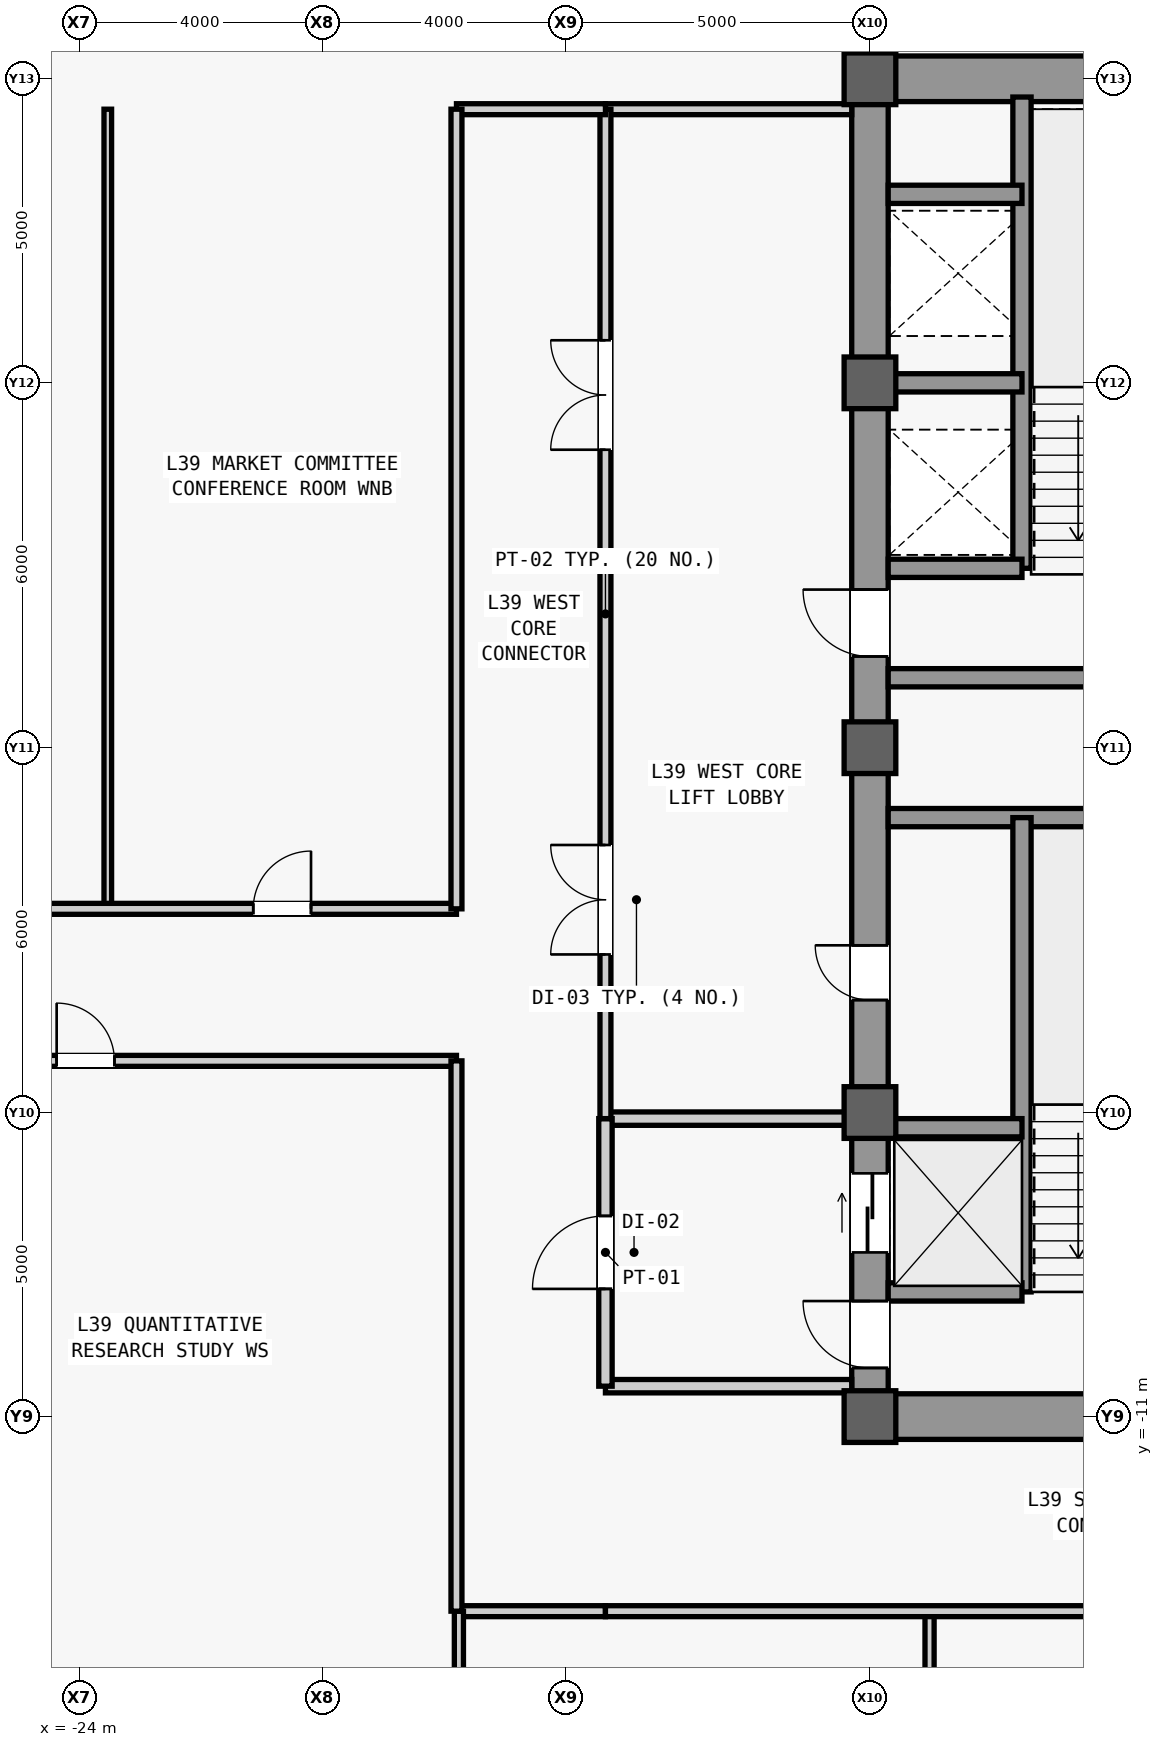
"""IFC4 building model, lengths in metres.
Left out: names, types, materials, properties, quantities, classifications, styles, units other than length and angle.
Written with IfcOpenShell. Run it as: python <this file> out.ifc"""

import sys

from ifc_helpers import new_model, si_unit, direction, frame, frame_2d, origin, origin_2d, place, context, subcontext, project, spatial, rectangle, extrude, source, transform, mapped, element, fill, save


model = new_model("IFC4")
c1 = context("Model", 3, precision=1e-05, world=origin(), true_north=direction((0.0, 1.0)))
c2 = subcontext(c1, "Body", "Model", "MODEL_VIEW")
j1 = project(units=[si_unit("LENGTHUNIT", "METRE"), si_unit("PLANEANGLEUNIT", "RADIAN")], contexts=[c1])
p1 = place(None, origin())
s1 = spatial("IfcSite", under=j1, at=p1, CompositionType="ELEMENT")
p2 = place(p1, origin())
s2 = spatial("IfcBuilding", under=s1, at=p2, CompositionType="ELEMENT")
p3 = place(p2, frame((0.0, 0.0, 171.1)))
s3 = spatial("IfcBuildingStorey", under=s2, at=p3, CompositionType="ELEMENT", Elevation=171.1)
m1 = source(origin(), c2, "Body", "SweptSolid", [
    extrude(rectangle(XDim=22.0, YDim=0.6, at=frame_2d((11.0, 0.0))), origin(), (0.0, 0.0, 1.0), 3.78),
])
p4 = place(p3, frame((-11.0, -11.0, 0.0), z_axis=(0.0, 0.0, 1.0), x_axis=(0.0, 1.0, 0.0)))
e1 = element("IfcWall", 1, at=p4, inside=s3, PredefinedType="SHEAR", context=c2, shape_type="MappedRepresentation", body=[
    mapped(m1, transform((0.0, 0.0, 0.0), scale=1.0)),
])
m2 = source(origin(), c2, "Body", "SweptSolid", [
    extrude(rectangle(XDim=1.1, YDim=2.2, at=frame_2d((0.55, 1.1))), frame((0.0, 0.31, 0.0), z_axis=(0.0, -1.0, 0.0), x_axis=(1.0, 0.0, 0.0)), (0.0, 0.0, 1.0), 0.62),
])
p5 = place(p4, frame((0.8, 0.0, 0.0)))
e2 = element("IfcOpeningElement", 2, at=p5, cuts=e1, PredefinedType="OPENING", context=c2, shape_type="MappedRepresentation", body=[
    mapped(m2, transform((0.0, 0.0, 0.0), scale=1.0)),
])
p6 = place(p4, frame((12.5, 0.0, 0.0)))
e3 = element("IfcOpeningElement", 3, at=p6, cuts=e1, PredefinedType="OPENING", context=c2, shape_type="MappedRepresentation", body=[
    mapped(m2, transform((0.0, 0.0, 0.0), scale=1.0)),
])
m3 = source(origin(), c2, "Body", "SweptSolid", [
    extrude(rectangle(XDim=0.9, YDim=2.15, at=frame_2d((0.45, 1.075))), frame((0.0, 0.31, 0.0), z_axis=(0.0, -1.0, 0.0), x_axis=(1.0, 0.0, 0.0)), (0.0, 0.0, 1.0), 0.62),
])
p7 = place(p4, frame((6.85, 0.0, 0.0)))
e4 = element("IfcOpeningElement", 4, at=p7, cuts=e1, PredefinedType="OPENING", context=c2, shape_type="MappedRepresentation", body=[
    mapped(m3, transform((0.0, 0.0, 0.0), scale=1.0)),
])
m4 = source(origin(), c2, "Body", "SweptSolid", [
    extrude(rectangle(XDim=1.3, YDim=2.3, at=frame_2d((0.65, 1.15))), frame((0.0, 0.31, 0.0), z_axis=(0.0, -1.0, 0.0), x_axis=(1.0, 0.0, 0.0)), (0.0, 0.0, 1.0), 0.62),
])
p8 = place(p4, frame((2.7, 0.0, 0.0)))
e5 = element("IfcOpeningElement", 5, at=p8, cuts=e1, PredefinedType="OPENING", context=c2, shape_type="MappedRepresentation", body=[
    mapped(m4, transform((0.0, 0.0, 0.0), scale=1.0)),
])
m5 = source(origin(), c2, "Body", "SweptSolid", [
    extrude(rectangle(XDim=5.85, YDim=0.75, at=frame_2d((2.925, 0.0))), origin(), (0.0, 0.0, 1.0), 3.78),
])
for number, where, z_axis, x_axis in (
    (6, (-10.7, -11.0, 0.0), (0.0, 0.0, 1.0), (1.0, 0.0, 0.0)),
    (7, (-10.7, 11.0, 0.0), (0.0, 0.0, 1.0), (1.0, 0.0, 0.0)),
):
    element("IfcWall", number, at=place(p3, frame(where, z_axis=z_axis, x_axis=x_axis)), inside=s3, PredefinedType="SHEAR", context=c2, shape_type="MappedRepresentation", body=[
        mapped(m5, transform((0.0, 0.0, 0.0), scale=1.0)),
    ])
m6 = source(origin(), c2, "Body", "SweptSolid", [
    extrude(rectangle(XDim=5.6, YDim=0.3, at=frame_2d((2.8, 0.0))), origin(), (0.0, 0.0, 1.0), 3.78),
])
for number, where, z_axis, x_axis in (
    (8, (-10.7, -1.15, 0.0), (0.0, 0.0, 1.0), (1.0, 0.0, 0.0)),
    (9, (-10.7, 1.15, 0.0), (0.0, 0.0, 1.0), (1.0, 0.0, 0.0)),
):
    element("IfcWall", number, at=place(p3, frame(where, z_axis=z_axis, x_axis=x_axis)), inside=s3, PredefinedType="SHEAR", context=c2, shape_type="MappedRepresentation", body=[
        mapped(m6, transform((0.0, 0.0, 0.0), scale=1.0)),
    ])
m7 = source(origin(), c2, "Body", "SweptSolid", [
    extrude(rectangle(XDim=0.85, YDim=0.85, at=origin_2d()), origin(), (0.0, 0.0, 1.0), 4.0),
])
for number, where, z_axis, x_axis in (
    (10, (-11.0, -11.0, 0.0), (0.0, 0.0, 1.0), (1.0, 0.0, 0.0)),
    (11, (-11.0, -6.0, 0.0), (0.0, 0.0, 1.0), (1.0, 0.0, 0.0)),
    (12, (-11.0, 0.0, 0.0), (0.0, 0.0, 1.0), (1.0, 0.0, 0.0)),
    (13, (-11.0, 6.0, 0.0), (0.0, 0.0, 1.0), (1.0, 0.0, 0.0)),
    (14, (-11.0, 11.0, 0.0), (0.0, 0.0, 1.0), (1.0, 0.0, 0.0)),
):
    element("IfcColumn", number, at=place(p3, frame(where, z_axis=z_axis, x_axis=x_axis)), inside=s3, PredefinedType="COLUMN", context=c2, shape_type="MappedRepresentation", body=[
        mapped(m7, transform((0.0, 0.0, 0.0), scale=1.0)),
    ])
m8 = source(origin(), c2, "Body", "SweptSolid", [
    extrude(rectangle(XDim=7.8, YDim=0.3, at=frame_2d((3.9, 0.0))), origin(), (0.0, 0.0, 1.0), 3.78),
])
p9 = place(p3, frame((-8.5, -8.95, 0.0), z_axis=(0.0, 0.0, 1.0), x_axis=(0.0, 1.0, 0.0)))
e15 = element("IfcWall", 15, at=p9, inside=s3, PredefinedType="SHEAR", context=c2, shape_type="MappedRepresentation", body=[
    mapped(m8, transform((0.0, 0.0, 0.0), scale=1.0)),
])
m9 = source(origin(), c2, "Body", "SweptSolid", [
    extrude(rectangle(XDim=2.2, YDim=0.3, at=frame_2d((1.1, 0.0))), origin(), (0.0, 0.0, 1.0), 3.78),
])
for number, where, z_axis, x_axis in (
    (16, (-10.7, -8.95, 0.0), (0.0, 0.0, 1.0), (1.0, 0.0, 0.0)),
    (17, (-10.7, -6.25, 0.0), (0.0, 0.0, 1.0), (1.0, 0.0, 0.0)),
):
    element("IfcWall", number, at=place(p3, frame(where, z_axis=z_axis, x_axis=x_axis)), inside=s3, PredefinedType="SHEAR", context=c2, shape_type="MappedRepresentation", body=[
        mapped(m9, transform((0.0, 0.0, 0.0), scale=1.0)),
    ])
m10 = source(origin(), c2, "Body", "SweptSolid", [
    extrude(rectangle(XDim=7.75, YDim=0.3, at=frame_2d((3.875, 0.0))), origin(), (0.0, 0.0, 1.0), 3.78),
])
p10 = place(p3, frame((-8.5, 2.95, 0.0), z_axis=(0.0, 0.0, 1.0), x_axis=(0.0, 1.0, 0.0)))
e18 = element("IfcWall", 18, at=p10, inside=s3, PredefinedType="SHEAR", context=c2, shape_type="MappedRepresentation", body=[
    mapped(m10, transform((0.0, 0.0, 0.0), scale=1.0)),
])
for number, where, z_axis, x_axis in (
    (19, (-10.7, 2.95, 0.0), (0.0, 0.0, 1.0), (1.0, 0.0, 0.0)),
    (20, (-10.7, 6.0, 0.0), (0.0, 0.0, 1.0), (1.0, 0.0, 0.0)),
    (21, (-10.7, 9.1, 0.0), (0.0, 0.0, 1.0), (1.0, 0.0, 0.0)),
):
    element("IfcWall", number, at=place(p3, frame(where, z_axis=z_axis, x_axis=x_axis)), inside=s3, PredefinedType="SHEAR", context=c2, shape_type="MappedRepresentation", body=[
        mapped(m9, transform((0.0, 0.0, 0.0), scale=1.0)),
    ])
m11 = source(origin(), c2, "Body", "SweptSolid", [
    extrude(rectangle(XDim=4.05, YDim=0.22, at=frame_2d((2.025, 0.0))), origin(), (0.0, 0.0, 1.0), 3.78),
])
p11 = place(p3, frame((-15.35, -10.5, 0.0), z_axis=(0.0, 0.0, 1.0), x_axis=(1.0, 0.0, 0.0)))
e22 = element("IfcWall", 22, at=p11, inside=s3, PredefinedType="PARTITIONING", context=c2, shape_type="MappedRepresentation", body=[
    mapped(m11, transform((0.0, 0.0, 0.0), scale=1.0)),
])
m12 = source(origin(), c2, "Body", "SweptSolid", [
    extrude(rectangle(XDim=4.05, YDim=0.22, at=frame_2d((2.025, 0.0))), origin(), (0.0, 0.0, 1.0), 3.007),
])
p12 = place(p3, frame((-15.35, -6.1, 0.0), z_axis=(0.0, 0.0, 1.0), x_axis=(1.0, 0.0, 0.0)))
e23 = element("IfcWall", 23, at=p12, inside=s3, PredefinedType="PARTITIONING", context=c2, shape_type="MappedRepresentation", body=[
    mapped(m12, transform((0.0, 0.0, 0.0), scale=1.0)),
])
m13 = source(origin(), c2, "Body", "SweptSolid", [
    extrude(rectangle(XDim=4.4, YDim=0.22, at=frame_2d((2.2, 0.0))), origin(), (0.0, 0.0, 1.0), 3.78),
])
p13 = place(p3, frame((-15.35, -10.5, 0.0), z_axis=(0.0, 0.0, 1.0), x_axis=(0.0, 1.0, 0.0)))
e24 = element("IfcWall", 24, at=p13, inside=s3, PredefinedType="PARTITIONING", context=c2, shape_type="MappedRepresentation", body=[
    mapped(m13, transform((0.0, 0.0, 0.0), scale=1.0)),
])
m14 = source(origin(), c2, "Body", "SweptSolid", [
    extrude(rectangle(XDim=1.2, YDim=2.2, at=frame_2d((0.6, 1.1))), frame((0.0, 0.12, 0.0), z_axis=(0.0, -1.0, 0.0), x_axis=(1.0, 0.0, 0.0)), (0.0, 0.0, 1.0), 0.24),
])
p14 = place(p13, frame((1.6, 0.0, 0.0)))
e25 = element("IfcOpeningElement", 25, at=p14, cuts=e24, PredefinedType="OPENING", context=c2, shape_type="MappedRepresentation", body=[
    mapped(m14, transform((0.0, 0.0, 0.0), scale=1.0)),
])
m15 = source(origin(), c2, "Body", "SweptSolid", [
    extrude(rectangle(XDim=4.05, YDim=0.18, at=frame_2d((2.025, 0.0))), origin(), (0.0, 0.0, 1.0), 3.78),
])
p15 = place(p3, frame((-15.35, 10.5, 0.0), z_axis=(0.0, 0.0, 1.0), x_axis=(1.0, 0.0, 0.0)))
e26 = element("IfcWall", 26, at=p15, inside=s3, PredefinedType="PARTITIONING", context=c2, shape_type="MappedRepresentation", body=[
    mapped(m15, transform((0.0, 0.0, 0.0), scale=1.0)),
])
m16 = source(origin(), c2, "Body", "SweptSolid", [
    extrude(rectangle(XDim=16.6, YDim=0.18, at=frame_2d((8.3, 0.0))), origin(), (0.0, 0.0, 1.0), 3.78),
])
p16 = place(p3, frame((-15.35, -6.1, 0.0), z_axis=(0.0, 0.0, 1.0), x_axis=(0.0, 1.0, 0.0)))
e27 = element("IfcWall", 27, at=p16, inside=s3, PredefinedType="PARTITIONING", context=c2, shape_type="MappedRepresentation", body=[
    mapped(m16, transform((0.0, 0.0, 0.0), scale=1.0)),
])
m17 = source(origin(), c2, "Body", "SweptSolid", [
    extrude(rectangle(XDim=1.8, YDim=2.25, at=frame_2d((0.9, 1.125))), frame((0.0, 0.1, 0.0), z_axis=(0.0, -1.0, 0.0), x_axis=(1.0, 0.0, 0.0)), (0.0, 0.0, 1.0), 0.2),
])
p17 = place(p16, frame((2.7, 0.0, 0.0)))
e28 = element("IfcOpeningElement", 28, at=p17, cuts=e27, PredefinedType="OPENING", context=c2, shape_type="MappedRepresentation", body=[
    mapped(m17, transform((0.0, 0.0, 0.0), scale=1.0)),
])
p18 = place(p16, frame((11.0, 0.0, 0.0)))
e29 = element("IfcOpeningElement", 29, at=p18, cuts=e27, PredefinedType="OPENING", context=c2, shape_type="MappedRepresentation", body=[
    mapped(m17, transform((0.0, 0.0, 0.0), scale=1.0)),
])
m18 = source(origin(), c2, "Body", "SweptSolid", [
    extrude(rectangle(XDim=2.45, YDim=0.18, at=frame_2d((1.225, 0.0))), origin(), (0.0, 0.0, 1.0), 3.78),
])
for number, where, z_axis, x_axis in (
    (30, (-17.8, 10.5, 0.0), (0.0, 0.0, 1.0), (1.0, 0.0, 0.0)),
    (31, (-17.8, -14.2, 0.0), (0.0, 0.0, 1.0), (1.0, 0.0, 0.0)),
):
    element("IfcWall", number, at=place(p3, frame(where, z_axis=z_axis, x_axis=x_axis)), inside=s3, PredefinedType="PARTITIONING", context=c2, shape_type="MappedRepresentation", body=[
        mapped(m18, transform((0.0, 0.0, 0.0), scale=1.0)),
    ])
m19 = source(origin(), c2, "Body", "SweptSolid", [
    extrude(rectangle(XDim=15.8, YDim=0.15, at=frame_2d((7.9, 0.0))), origin(), (0.0, 0.0, 1.0), 3.78),
])
p19 = place(p3, frame((-17.76, -30.0, 0.0), z_axis=(0.0, 0.0, 1.0), x_axis=(0.0, 1.0, 0.0)))
e32 = element("IfcWall", 32, at=p19, inside=s3, PredefinedType="PARTITIONING", context=c2, shape_type="MappedRepresentation", body=[
    mapped(m19, transform((0.0, 0.0, 0.0), scale=1.0)),
])
m20 = source(origin(), c2, "Body", "SweptSolid", [
    extrude(rectangle(XDim=0.95, YDim=2.15, at=frame_2d((0.475, 1.075))), frame((0.0, 0.085, 0.0), z_axis=(0.0, -1.0, 0.0), x_axis=(1.0, 0.0, 0.0)), (0.0, 0.0, 1.0), 0.17),
])
p20 = place(p19, frame((11.375, 0.0, 0.0)))
e33 = element("IfcOpeningElement", 33, at=p20, cuts=e32, PredefinedType="OPENING", context=c2, shape_type="MappedRepresentation", body=[
    mapped(m20, transform((0.0, 0.0, 0.0), scale=1.0)),
])
p21 = place(p3, frame((-10.02, -30.0, 0.0), z_axis=(0.0, 0.0, 1.0), x_axis=(0.0, 1.0, 0.0)))
e34 = element("IfcWall", 34, at=p21, inside=s3, PredefinedType="PARTITIONING", context=c2, shape_type="MappedRepresentation", body=[
    mapped(m19, transform((0.0, 0.0, 0.0), scale=1.0)),
])
p22 = place(p21, frame((11.375, 0.0, 0.0)))
e35 = element("IfcOpeningElement", 35, at=p22, cuts=e34, PredefinedType="OPENING", context=c2, shape_type="MappedRepresentation", body=[
    mapped(m20, transform((0.0, 0.0, 0.0), scale=1.0)),
])
m21 = source(origin(), c2, "Body", "SweptSolid", [
    extrude(rectangle(XDim=11.35, YDim=0.18, at=frame_2d((5.675, 0.0))), origin(), (0.0, 0.0, 1.0), 3.78),
])
p23 = place(p3, frame((-15.35, -14.2, 0.0), z_axis=(0.0, 0.0, 1.0), x_axis=(1.0, 0.0, 0.0)))
e36 = element("IfcWall", 36, at=p23, inside=s3, PredefinedType="PARTITIONING", context=c2, shape_type="MappedRepresentation", body=[
    mapped(m21, transform((0.0, 0.0, 0.0), scale=1.0)),
])
m22 = source(origin(), c2, "Body", "SweptSolid", [
    extrude(rectangle(XDim=12.2, YDim=0.18, at=frame_2d((6.1, 0.0))), origin(), (0.0, 0.0, 1.0), 3.78),
])
p24 = place(p3, frame((-30.0, -5.15, 0.0), z_axis=(0.0, 0.0, 1.0), x_axis=(1.0, 0.0, 0.0)))
e37 = element("IfcWall", 37, at=p24, inside=s3, PredefinedType="PARTITIONING", context=c2, shape_type="MappedRepresentation", body=[
    mapped(m22, transform((0.0, 0.0, 0.0), scale=1.0)),
])
m23 = source(origin(), c2, "Body", "SweptSolid", [
    extrude(rectangle(XDim=0.95, YDim=2.15, at=frame_2d((0.475, 1.075))), frame((0.0, 0.1, 0.0), z_axis=(0.0, -1.0, 0.0), x_axis=(1.0, 0.0, 0.0)), (0.0, 0.0, 1.0), 0.2),
])
p25 = place(p24, frame((5.625, 0.0, 0.0)))
e38 = element("IfcOpeningElement", 38, at=p25, cuts=e37, PredefinedType="OPENING", context=c2, shape_type="MappedRepresentation", body=[
    mapped(m23, transform((0.0, 0.0, 0.0), scale=1.0)),
])
m24 = source(origin(), c2, "Body", "SweptSolid", [
    extrude(rectangle(XDim=9.05, YDim=0.18, at=frame_2d((4.525, 0.0))), origin(), (0.0, 0.0, 1.0), 3.78),
])
p26 = place(p3, frame((-17.8, -14.2, 0.0), z_axis=(0.0, 0.0, 1.0), x_axis=(0.0, 1.0, 0.0)))
e39 = element("IfcWall", 39, at=p26, inside=s3, PredefinedType="PARTITIONING", context=c2, shape_type="MappedRepresentation", body=[
    mapped(m24, transform((0.0, 0.0, 0.0), scale=1.0)),
])
m25 = source(origin(), c2, "Body", "SweptSolid", [
    extrude(rectangle(XDim=13.15, YDim=0.125, at=frame_2d((6.575, 0.0))), origin(), (0.0, 0.0, 1.0), 3.78),
])
p27 = place(p3, frame((-23.534, -2.65, 0.0), z_axis=(0.0, 0.0, 1.0), x_axis=(0.0, 1.0, 0.0)))
e40 = element("IfcWall", 40, at=p27, inside=s3, PredefinedType="PARTITIONING", context=c2, shape_type="MappedRepresentation", body=[
    mapped(m25, transform((0.0, 0.0, 0.0), scale=1.0)),
])
p28 = place(p3, frame((-30.0, -2.65, 0.0), z_axis=(0.0, 0.0, 1.0), x_axis=(1.0, 0.0, 0.0)))
e41 = element("IfcWall", 41, at=p28, inside=s3, PredefinedType="PARTITIONING", context=c2, shape_type="MappedRepresentation", body=[
    mapped(m22, transform((0.0, 0.0, 0.0), scale=1.0)),
])
p29 = place(p28, frame((2.758, 0.0, 0.0)))
e42 = element("IfcOpeningElement", 42, at=p29, cuts=e41, PredefinedType="OPENING", context=c2, shape_type="MappedRepresentation", body=[
    mapped(m23, transform((0.0, 0.0, 0.0), scale=1.0)),
])
p30 = place(p28, frame((8.858, 0.0, 0.0)))
e43 = element("IfcOpeningElement", 43, at=p30, cuts=e41, PredefinedType="OPENING", context=c2, shape_type="MappedRepresentation", body=[
    mapped(m23, transform((0.0, 0.0, 0.0), scale=1.0)),
])
m26 = source(origin(), c2, "Body", "SweptSolid", [
    extrude(rectangle(XDim=13.15, YDim=0.18, at=frame_2d((6.575, 0.0))), origin(), (0.0, 0.0, 1.0), 3.78),
])
p31 = place(p3, frame((-17.8, -2.65, 0.0), z_axis=(0.0, 0.0, 1.0), x_axis=(0.0, 1.0, 0.0)))
e44 = element("IfcWall", 44, at=p31, inside=s3, PredefinedType="PARTITIONING", context=c2, shape_type="MappedRepresentation", body=[
    mapped(m26, transform((0.0, 0.0, 0.0), scale=1.0)),
])
m27 = source(origin(), c2, "Body", "SweptSolid", [
    extrude(rectangle(XDim=1.1, YDim=2.2, at=frame_2d((0.55, 1.1))), frame((0.0, 0.025, 0.0), z_axis=(0.0, -1.0, 0.0), x_axis=(1.0, 0.0, 0.0)), (0.0, 0.0, 1.0), 0.05),
])
p32 = place(p5, origin())
e45 = element("IfcDoor", 45, at=p32, inside=s3, OperationType="SINGLE_SWING_RIGHT", PredefinedType="DOOR", context=c2, shape_type="MappedRepresentation", body=[
    mapped(m27, transform((0.0, 0.0, 0.0), scale=1.0)),
])
fill(e2, e45)
p33 = place(p6, origin())
e46 = element("IfcDoor", 46, at=p33, inside=s3, OperationType="SINGLE_SWING_RIGHT", PredefinedType="DOOR", context=c2, shape_type="MappedRepresentation", body=[
    mapped(m27, transform((0.0, 0.0, 0.0), scale=1.0)),
])
fill(e3, e46)
m28 = source(origin(), c2, "Body", "SweptSolid", [
    extrude(rectangle(XDim=0.9, YDim=2.15, at=frame_2d((0.45, 1.075))), frame((0.0, 0.025, 0.0), z_axis=(0.0, -1.0, 0.0), x_axis=(1.0, 0.0, 0.0)), (0.0, 0.0, 1.0), 0.05),
])
p34 = place(p7, origin())
e47 = element("IfcDoor", 47, at=p34, inside=s3, OperationType="SINGLE_SWING_RIGHT", PredefinedType="DOOR", context=c2, shape_type="MappedRepresentation", body=[
    mapped(m28, transform((0.0, 0.0, 0.0), scale=1.0)),
])
fill(e4, e47)
m29 = source(origin(), c2, "Body", "SweptSolid", [
    extrude(rectangle(XDim=1.2, YDim=2.2, at=frame_2d((0.6, 1.1))), frame((0.0, 0.025, 0.0), z_axis=(0.0, -1.0, 0.0), x_axis=(1.0, 0.0, 0.0)), (0.0, 0.0, 1.0), 0.05),
])
p35 = place(p14, origin())
e48 = element("IfcDoor", 48, at=p35, inside=s3, OperationType="SINGLE_SWING_LEFT", PredefinedType="DOOR", context=c2, shape_type="MappedRepresentation", body=[
    mapped(m29, transform((0.0, 0.0, 0.0), scale=1.0)),
])
fill(e25, e48)
m30 = source(origin(), c2, "Body", "SweptSolid", [
    extrude(rectangle(XDim=1.8, YDim=2.25, at=frame_2d((0.9, 1.125))), frame((0.0, 0.025, 0.0), z_axis=(0.0, -1.0, 0.0), x_axis=(1.0, 0.0, 0.0)), (0.0, 0.0, 1.0), 0.05),
])
p36 = place(p17, origin())
e49 = element("IfcDoor", 49, at=p36, inside=s3, OperationType="SINGLE_SWING_LEFT", PredefinedType="DOOR", context=c2, shape_type="MappedRepresentation", body=[
    mapped(m30, transform((0.0, 0.0, 0.0), scale=1.0)),
])
fill(e28, e49)
p37 = place(p18, origin())
e50 = element("IfcDoor", 50, at=p37, inside=s3, OperationType="SINGLE_SWING_RIGHT", PredefinedType="DOOR", context=c2, shape_type="MappedRepresentation", body=[
    mapped(m30, transform((0.0, 0.0, 0.0), scale=1.0)),
])
fill(e29, e50)
m31 = source(origin(), c2, "Body", "SweptSolid", [
    extrude(rectangle(XDim=0.95, YDim=2.15, at=frame_2d((0.475, 1.075))), frame((0.0, 0.025, 0.0), z_axis=(0.0, -1.0, 0.0), x_axis=(1.0, 0.0, 0.0)), (0.0, 0.0, 1.0), 0.05),
])
p38 = place(p25, origin())
e51 = element("IfcDoor", 51, at=p38, inside=s3, OperationType="SINGLE_SWING_LEFT", PredefinedType="DOOR", context=c2, shape_type="MappedRepresentation", body=[
    mapped(m31, transform((0.0, 0.0, 0.0), scale=1.0)),
])
fill(e38, e51)
p39 = place(p30, origin())
e52 = element("IfcDoor", 52, at=p39, inside=s3, OperationType="SINGLE_SWING_RIGHT", PredefinedType="DOOR", context=c2, shape_type="MappedRepresentation", body=[
    mapped(m31, transform((0.0, 0.0, 0.0), scale=1.0)),
])
fill(e43, e52)
m32 = source(origin(), c2, "Body", "SweptSolid", [
    extrude(rectangle(XDim=1.3, YDim=2.3, at=frame_2d((0.65, 1.15))), frame((0.0, 0.025, 0.0), z_axis=(0.0, -1.0, 0.0), x_axis=(1.0, 0.0, 0.0)), (0.0, 0.0, 1.0), 0.05),
])
p40 = place(p8, origin())
e53 = element("IfcDoor", 53, at=p40, inside=s3, OperationType="SLIDING_TO_LEFT", PredefinedType="DOOR", context=c2, shape_type="MappedRepresentation", body=[
    mapped(m32, transform((0.0, 0.0, 0.0), scale=1.0)),
])
fill(e5, e53)
save(model, sys.argv[1])
